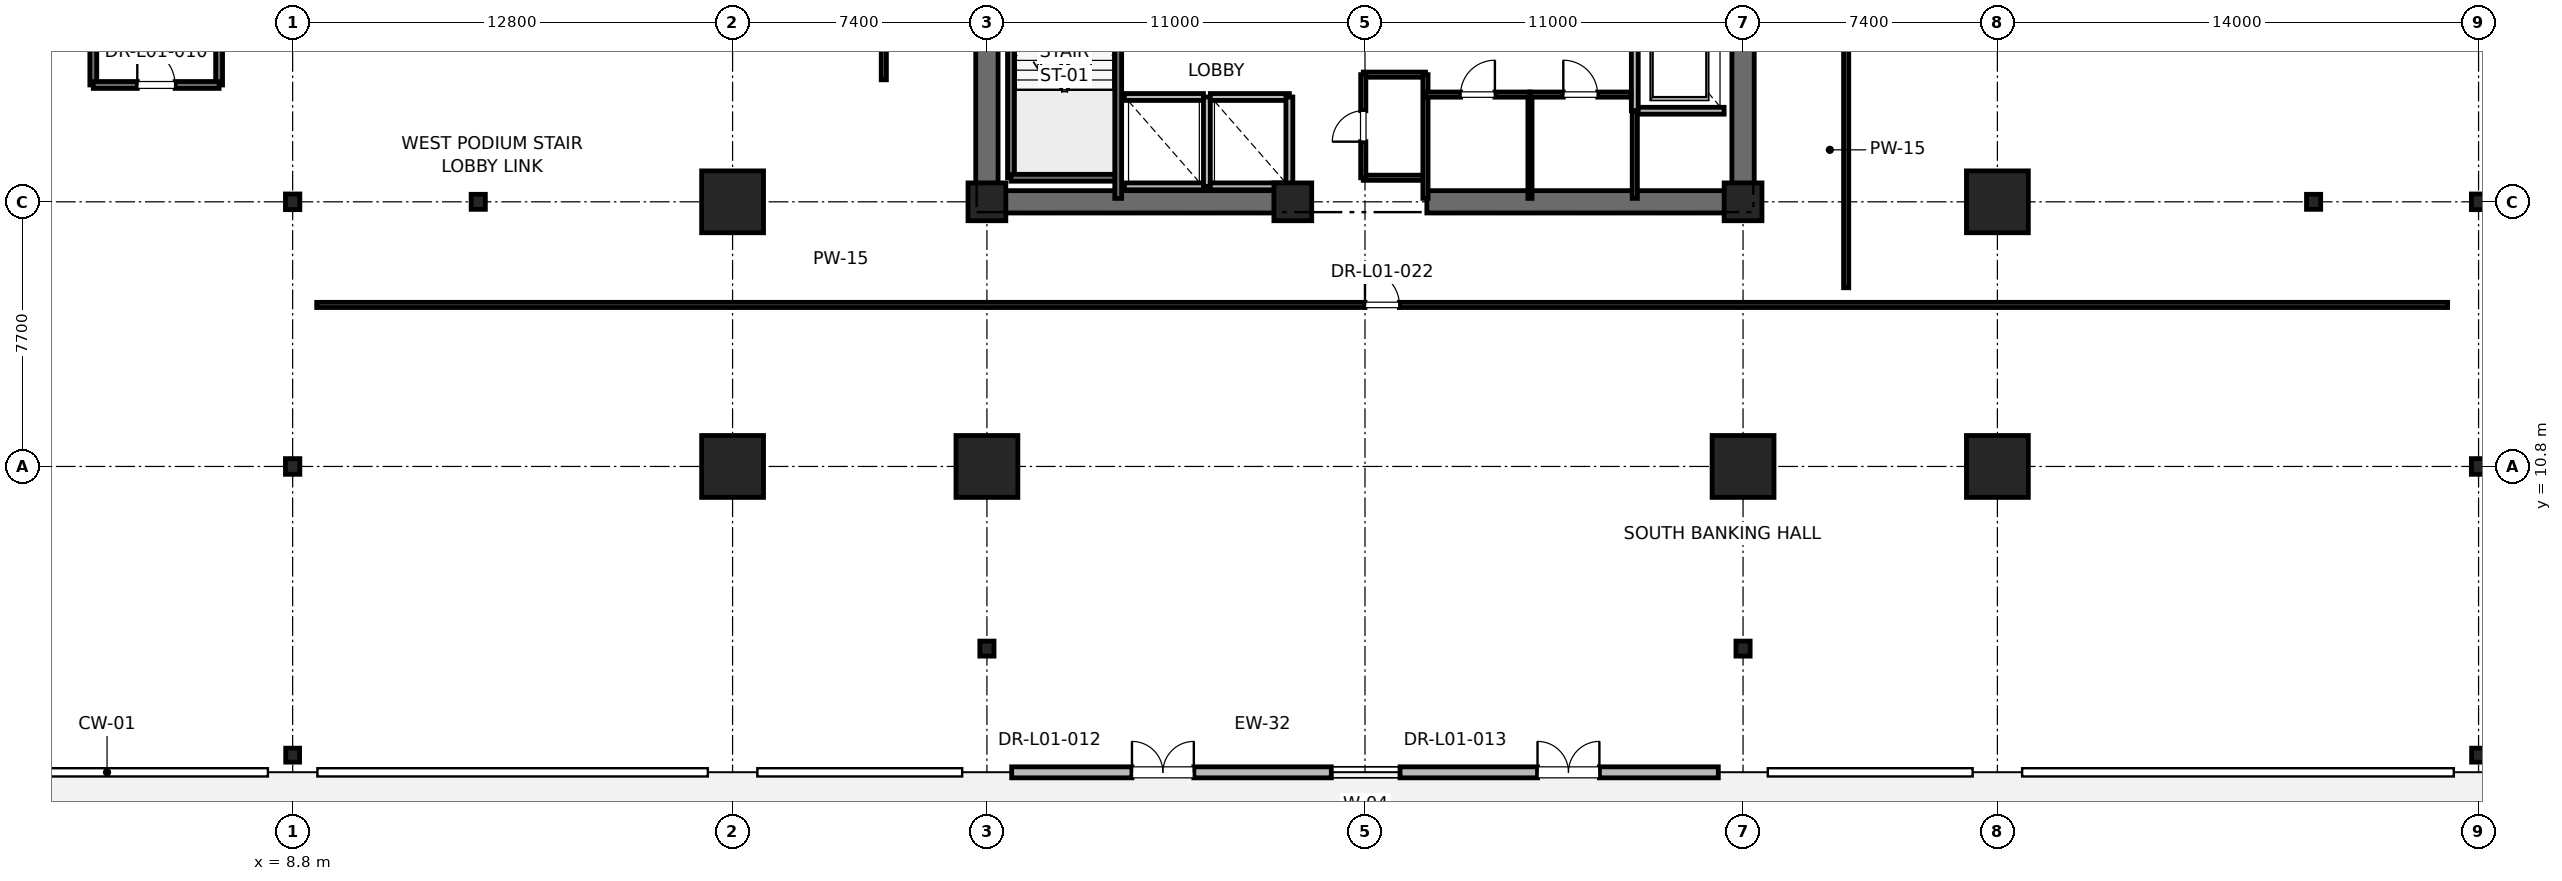
"""IFC4 building model, lengths in metres.
Left out: names, types, materials, properties, quantities, classifications, styles, units other than length and angle.
Written with IfcOpenShell. Run it as: python <this file> out.ifc"""

import sys

from ifc_helpers import new_model, si_unit, direction, frame, frame_2d, origin, origin_2d, place, context, subcontext, project, spatial, rectangle, i_section, extrude, element, fill, save


model = new_model("IFC4")
c1 = context("Model", 3, precision=1e-05, world=origin(), true_north=direction((0.0, 1.0)))
c2 = subcontext(c1, "Body", "Model", "MODEL_VIEW")
j1 = project(units=[si_unit("LENGTHUNIT", "METRE"), si_unit("PLANEANGLEUNIT", "RADIAN")], contexts=[c1])
p1 = place(None, origin())
s1 = spatial("IfcSite", under=j1, at=p1, CompositionType="ELEMENT")
p2 = place(p1, origin())
s2 = spatial("IfcBuilding", under=s1, at=p2, CompositionType="ELEMENT")
p3 = place(p2, frame((0.0, 0.0, 6.0)))
s3 = spatial("IfcBuildingStorey", under=s2, at=p3, CompositionType="ELEMENT", Elevation=6.0)
for number, where, z_axis, x_axis in (
    (1, (29.0, 10.8, 0.0), (0.0, 0.0, 1.0), (1.0, 0.0, 0.0)),
    (2, (51.0, 10.8, 0.0), (0.0, 0.0, 1.0), (1.0, 0.0, 0.0)),
    (3, (21.6, 18.5, 0.0), (0.0, 0.0, 1.0), (1.0, 0.0, 0.0)),
    (4, (58.4, 18.5, 0.0), (0.0, 0.0, 1.0), (1.0, 0.0, 0.0)),
    (5, (21.6, 10.8, 0.0), (0.0, 0.0, 1.0), (1.0, 0.0, 0.0)),
    (6, (58.4, 10.8, 0.0), (0.0, 0.0, 1.0), (1.0, 0.0, 0.0)),
):
    element("IfcColumn", number, at=place(p3, frame(where, z_axis=z_axis, x_axis=x_axis)), inside=s3, PredefinedType="COLUMN", context=c2, shape_type="SweptSolid", body=[
        extrude(rectangle(XDim=1.8, YDim=1.8, at=origin_2d()), origin(), (0.0, 0.0, 1.0), 5.2),
    ])
for number, where, z_axis, x_axis in (
    (7, (14.2, 18.5, 0.0), (0.0, 0.0, 1.0), (1.0, 0.0, 0.0)),
    (8, (67.6, 18.5, 0.0), (0.0, 0.0, 1.0), (1.0, 0.0, 0.0)),
    (9, (29.0, 5.5, 0.0), (0.0, 0.0, 1.0), (1.0, 0.0, 0.0)),
    (10, (51.0, 5.5, 0.0), (0.0, 0.0, 1.0), (1.0, 0.0, 0.0)),
):
    element("IfcColumn", number, at=place(p3, frame(where, z_axis=z_axis, x_axis=x_axis)), inside=s3, PredefinedType="COLUMN", context=c2, shape_type="SweptSolid", body=[
        extrude(i_section(OverallWidth=0.412, OverallDepth=0.437, WebThickness=0.036, FlangeThickness=0.058, FilletRadius=0.015, at=origin_2d()), origin(), (0.0, 0.0, 1.0), 5.2),
    ])
for number, where, z_axis, x_axis in (
    (11, (29.0, 18.5, 0.0), (0.0, 0.0, 1.0), (1.0, 0.0, 0.0)),
    (12, (51.0, 18.5, 0.0), (0.0, 0.0, 1.0), (1.0, 0.0, 0.0)),
    (13, (37.9, 18.5, 0.0), (0.0, 0.0, 1.0), (1.0, 0.0, 0.0)),
):
    element("IfcColumn", number, at=place(p3, frame(where, z_axis=z_axis, x_axis=x_axis)), inside=s3, PredefinedType="PILASTER", context=c2, shape_type="SweptSolid", body=[
        extrude(rectangle(XDim=1.1, YDim=1.1, at=origin_2d()), origin(), (0.0, 0.0, 1.0), 5.2),
    ])
for number, where, z_axis, x_axis in (
    (14, (8.8, 10.8, 0.0), (0.0, 0.0, 1.0), (1.0, 0.0, 0.0)),
    (15, (8.8, 18.5, 0.0), (0.0, 0.0, 1.0), (1.0, 0.0, 0.0)),
    (16, (72.4, 10.8, 0.0), (0.0, 0.0, 1.0), (1.0, 0.0, 0.0)),
    (17, (72.4, 18.5, 0.0), (0.0, 0.0, 1.0), (1.0, 0.0, 0.0)),
):
    element("IfcColumn", number, at=place(p3, frame(where, z_axis=z_axis, x_axis=x_axis)), inside=s3, PredefinedType="COLUMN", context=c2, shape_type="SweptSolid", body=[
        extrude(i_section(OverallWidth=0.418, OverallDepth=0.456, WebThickness=0.042, FlangeThickness=0.067, FilletRadius=0.015, at=origin_2d()), origin(), (0.0, 0.0, 1.0), 5.2),
    ])
for number, where, z_axis, x_axis in (
    (18, (8.8, 2.4, 0.0), (0.0, 0.0, 1.0), (1.0, 0.0, 0.0)),
    (19, (72.4, 2.4, 0.0), (0.0, 0.0, 1.0), (1.0, 0.0, 0.0)),
):
    element("IfcColumn", number, at=place(p3, frame(where, z_axis=z_axis, x_axis=x_axis)), inside=s3, PredefinedType="COLUMN", context=c2, shape_type="SweptSolid", body=[
        extrude(i_section(OverallWidth=0.403, OverallDepth=0.406, WebThickness=0.027, FlangeThickness=0.043, FilletRadius=0.015, at=origin_2d()), origin(), (0.0, 0.0, 1.0), 4.9),
    ])
for number, where, z_axis, x_axis in (
    (20, (29.0, 18.5, 0.0), (0.0, 0.0, 1.0), (1.0, 0.0, 0.0)),
    (21, (41.8, 18.5, 0.0), (0.0, 0.0, 1.0), (1.0, 0.0, 0.0)),
):
    element("IfcWall", number, at=place(p3, frame(where, z_axis=z_axis, x_axis=x_axis)), inside=s3, PredefinedType="SHEAR", context=c2, shape_type="SweptSolid", body=[
        extrude(rectangle(XDim=9.2, YDim=0.65, at=frame_2d((4.6, 0.0))), origin(), (0.0, 0.0, 1.0), 4.92),
    ])
p4 = place(p3, frame((29.0, 18.5, 0.0), z_axis=(0.0, 0.0, 1.0), x_axis=(0.0, 1.0, 0.0)))
e22 = element("IfcWall", 22, at=p4, inside=s3, PredefinedType="SHEAR", context=c2, shape_type="SweptSolid", body=[
    extrude(rectangle(XDim=8.8, YDim=0.65, at=frame_2d((4.4, 0.0))), origin(), (0.0, 0.0, 1.0), 4.92),
])
p5 = place(p3, frame((51.0, 18.5, 0.0), z_axis=(0.0, 0.0, 1.0), x_axis=(0.0, 1.0, 0.0)))
e23 = element("IfcWall", 23, at=p5, inside=s3, PredefinedType="SHEAR", context=c2, shape_type="SweptSolid", body=[
    extrude(rectangle(XDim=5.8, YDim=0.65, at=frame_2d((2.9, 0.0))), origin(), (0.0, 0.0, 1.0), 4.92),
])
p6 = place(p3, frame((29.72, 1.9, 0.0), z_axis=(0.0, 0.0, 1.0), x_axis=(1.0, 0.0, 0.0)))
e24 = element("IfcWall", 24, at=p6, inside=s3, PredefinedType="SOLIDWALL", context=c2, shape_type="SweptSolid", body=[
    extrude(rectangle(XDim=20.56, YDim=0.32, at=frame_2d((10.28, 0.0))), origin(), (0.0, 0.0, 1.0), 3.53),
])
p7 = place(p6, frame((3.5, 0.0, 0.0)))
e25 = element("IfcOpeningElement", 25, at=p7, cuts=e24, PredefinedType="OPENING", context=c2, shape_type="SweptSolid", body=[
    extrude(rectangle(XDim=1.8, YDim=2.4, at=frame_2d((0.9, 1.2))), frame((0.0, 0.16, 0.0), z_axis=(0.0, -1.0, 0.0), x_axis=(1.0, 0.0, 0.0)), (0.0, 0.0, 1.0), 0.32),
])
p8 = place(p6, frame((9.3, 0.0, 0.9)))
e26 = element("IfcOpeningElement", 26, at=p8, cuts=e24, PredefinedType="OPENING", context=c2, shape_type="SweptSolid", body=[
    extrude(rectangle(XDim=2.0, YDim=2.3, at=frame_2d((1.0, 1.15))), frame((0.0, 0.16, 0.0), z_axis=(0.0, -1.0, 0.0), x_axis=(1.0, 0.0, 0.0)), (0.0, 0.0, 1.0), 0.32),
])
p9 = place(p6, frame((15.3, 0.0, 0.0)))
e27 = element("IfcOpeningElement", 27, at=p9, cuts=e24, PredefinedType="OPENING", context=c2, shape_type="SweptSolid", body=[
    extrude(rectangle(XDim=1.8, YDim=2.4, at=frame_2d((0.9, 1.2))), frame((0.0, 0.16, 0.0), z_axis=(0.0, -1.0, 0.0), x_axis=(1.0, 0.0, 0.0)), (0.0, 0.0, 1.0), 0.32),
])
p10 = place(p3, frame((29.7, 19.2, 0.0), z_axis=(0.0, 0.0, 1.0), x_axis=(0.0, 1.0, 0.0)))
e28 = element("IfcWall", 28, at=p10, inside=s3, PredefinedType="SOLIDWALL", context=c2, shape_type="SweptSolid", body=[
    extrude(rectangle(XDim=8.15, YDim=0.2, at=frame_2d((4.075, 0.0))), origin(), (0.0, 0.0, 1.0), 4.92),
])
p11 = place(p3, frame((29.7, 19.2, 0.0), z_axis=(0.0, 0.0, 1.0), x_axis=(1.0, 0.0, 0.0)))
e29 = element("IfcWall", 29, at=p11, inside=s3, PredefinedType="SOLIDWALL", context=c2, shape_type="SweptSolid", body=[
    extrude(rectangle(XDim=3.12, YDim=0.2, at=frame_2d((1.56, 0.0))), origin(), (0.0, 0.0, 1.0), 4.92),
])
p12 = place(p3, frame((32.82, 18.6, 0.0), z_axis=(0.0, 0.0, 1.0), x_axis=(0.0, 1.0, 0.0)))
e30 = element("IfcWall", 30, at=p12, inside=s3, PredefinedType="SOLIDWALL", context=c2, shape_type="SweptSolid", body=[
    extrude(rectangle(XDim=8.78, YDim=0.2, at=frame_2d((4.39, 0.0))), origin(), (0.0, 0.0, 1.0), 4.92),
])
for number, where, z_axis, x_axis in (
    (31, (3.0, 21.9, 0.0), (0.0, 0.0, 1.0), (0.0, 1.0, 0.0)),
    (32, (6.66, 21.9, 0.0), (0.0, 0.0, 1.0), (0.0, 1.0, 0.0)),
):
    element("IfcWall", number, at=place(p3, frame(where, z_axis=z_axis, x_axis=x_axis)), inside=s3, PredefinedType="SOLIDWALL", context=c2, shape_type="SweptSolid", body=[
        extrude(rectangle(XDim=8.7, YDim=0.2, at=frame_2d((4.35, 0.0))), origin(), (0.0, 0.0, 1.0), 4.92),
    ])
p13 = place(p3, frame((3.0, 21.9, 0.0), z_axis=(0.0, 0.0, 1.0), x_axis=(1.0, 0.0, 0.0)))
e33 = element("IfcWall", 33, at=p13, inside=s3, PredefinedType="SOLIDWALL", context=c2, shape_type="SweptSolid", body=[
    extrude(rectangle(XDim=3.66, YDim=0.2, at=frame_2d((1.83, 0.0))), origin(), (0.0, 0.0, 1.0), 4.92),
])
p14 = place(p13, frame((1.28, 0.0, 0.0)))
e34 = element("IfcOpeningElement", 34, at=p14, cuts=e33, PredefinedType="OPENING", context=c2, shape_type="SweptSolid", body=[
    extrude(rectangle(XDim=1.1, YDim=2.15, at=frame_2d((0.55, 1.075))), frame((0.0, 0.1, 0.0), z_axis=(0.0, -1.0, 0.0), x_axis=(1.0, 0.0, 0.0)), (0.0, 0.0, 1.0), 0.2),
])
p15 = place(p3, frame((47.85, 21.15, 0.0), z_axis=(0.0, 0.0, 1.0), x_axis=(1.0, 0.0, 0.0)))
e35 = element("IfcWall", 35, at=p15, inside=s3, PredefinedType="SOLIDWALL", context=c2, shape_type="SweptSolid", body=[
    extrude(rectangle(XDim=2.6, YDim=0.2, at=frame_2d((1.3, 0.0))), origin(), (0.0, 0.0, 1.0), 4.92),
])
p16 = place(p3, frame((47.85, 24.15, 0.0), z_axis=(0.0, 0.0, 1.0), x_axis=(0.0, -1.0, 0.0)))
e36 = element("IfcWall", 36, at=p16, inside=s3, PredefinedType="SOLIDWALL", context=c2, shape_type="SweptSolid", body=[
    extrude(rectangle(XDim=3.0, YDim=0.2, at=frame_2d((1.5, 0.0))), origin(), (0.0, 0.0, 1.0), 4.92),
])
for number, where, z_axis, x_axis in (
    (37, (33.0, 18.95, 0.0), (0.0, 0.0, 1.0), (1.0, 0.0, 0.0)),
    (38, (35.3, 21.55, 0.0), (0.0, 0.0, 1.0), (-1.0, 0.0, 0.0)),
):
    element("IfcWall", number, at=place(p3, frame(where, z_axis=z_axis, x_axis=x_axis)), inside=s3, PredefinedType="SOLIDWALL", context=c2, shape_type="SweptSolid", body=[
        extrude(rectangle(XDim=2.3, YDim=0.2, at=frame_2d((1.15, 0.0))), origin(), (0.0, 0.0, 1.0), 4.92),
    ])
p17 = place(p3, frame((35.4, 18.95, 0.0), z_axis=(0.0, 0.0, 1.0), x_axis=(0.0, 1.0, 0.0)))
e39 = element("IfcWall", 39, at=p17, inside=s3, PredefinedType="SOLIDWALL", context=c2, shape_type="SweptSolid", body=[
    extrude(rectangle(XDim=2.6, YDim=0.2, at=frame_2d((1.3, 0.0))), origin(), (0.0, 0.0, 1.0), 4.92),
])
p18 = place(p3, frame((35.5, 18.95, 0.0), z_axis=(0.0, 0.0, 1.0), x_axis=(1.0, 0.0, 0.0)))
e40 = element("IfcWall", 40, at=p18, inside=s3, PredefinedType="SOLIDWALL", context=c2, shape_type="SweptSolid", body=[
    extrude(rectangle(XDim=2.3, YDim=0.2, at=frame_2d((1.15, 0.0))), origin(), (0.0, 0.0, 1.0), 3.7),
])
p19 = place(p3, frame((37.8, 21.55, 0.0), z_axis=(0.0, 0.0, 1.0), x_axis=(-1.0, 0.0, 0.0)))
e41 = element("IfcWall", 41, at=p19, inside=s3, PredefinedType="SOLIDWALL", context=c2, shape_type="SweptSolid", body=[
    extrude(rectangle(XDim=2.3, YDim=0.2, at=frame_2d((1.15, 0.0))), origin(), (0.0, 0.0, 1.0), 4.92),
])
p20 = place(p3, frame((37.8, 18.95, 0.0), z_axis=(0.0, 0.0, 1.0), x_axis=(0.0, 1.0, 0.0)))
e42 = element("IfcWall", 42, at=p20, inside=s3, PredefinedType="SOLIDWALL", context=c2, shape_type="SweptSolid", body=[
    extrude(rectangle(XDim=2.6, YDim=0.2, at=frame_2d((1.3, 0.0))), origin(), (0.0, 0.0, 1.0), 3.7),
])
for number, where, z_axis, x_axis in (
    (43, (39.95, 19.2, 0.0), (0.0, 0.0, 1.0), (1.0, 0.0, 0.0)),
    (44, (39.95, 22.2, 0.0), (0.0, 0.0, 1.0), (1.0, 0.0, 0.0)),
):
    element("IfcWall", number, at=place(p3, frame(where, z_axis=z_axis, x_axis=x_axis)), inside=s3, PredefinedType="PARTITIONING", context=c2, shape_type="SweptSolid", body=[
        extrude(rectangle(XDim=1.81, YDim=0.15, at=frame_2d((0.905, 0.0))), origin(), (0.0, 0.0, 1.0), 2.85),
    ])
p21 = place(p3, frame((41.76, 18.6, 0.0), z_axis=(0.0, 0.0, 1.0), x_axis=(0.0, 1.0, 0.0)))
e45 = element("IfcWall", 45, at=p21, inside=s3, PredefinedType="PARTITIONING", context=c2, shape_type="SweptSolid", body=[
    extrude(rectangle(XDim=3.6, YDim=0.15, at=frame_2d((1.8, 0.0))), origin(), (0.0, 0.0, 1.0), 2.85),
])
p22 = place(p3, frame((39.95, 19.2, 0.0), z_axis=(0.0, 0.0, 1.0), x_axis=(0.0, 1.0, 0.0)))
e46 = element("IfcWall", 46, at=p22, inside=s3, PredefinedType="PARTITIONING", context=c2, shape_type="SweptSolid", body=[
    extrude(rectangle(XDim=3.0, YDim=0.15, at=frame_2d((1.5, 0.0))), origin(), (0.0, 0.0, 1.0), 2.85),
])
p23 = place(p22, frame((1.05, 0.0, 0.0)))
e47 = element("IfcOpeningElement", 47, at=p23, cuts=e46, PredefinedType="OPENING", context=c2, shape_type="SweptSolid", body=[
    extrude(rectangle(XDim=0.9, YDim=2.1, at=frame_2d((0.45, 1.05))), frame((0.0, 0.075, 0.0), z_axis=(0.0, -1.0, 0.0), x_axis=(1.0, 0.0, 0.0)), (0.0, 0.0, 1.0), 0.15),
])
p24 = place(p3, frame((47.85, 18.6, 0.0), z_axis=(0.0, 0.0, 1.0), x_axis=(0.0, 1.0, 0.0)))
e48 = element("IfcWall", 48, at=p24, inside=s3, PredefinedType="PARTITIONING", context=c2, shape_type="SweptSolid", body=[
    extrude(rectangle(XDim=2.54, YDim=0.15, at=frame_2d((1.27, 0.0))), origin(), (0.0, 0.0, 1.0), 2.85),
])
p25 = place(p3, frame((44.8, 18.6, 0.0), z_axis=(0.0, 0.0, 1.0), x_axis=(0.0, 1.0, 0.0)))
e49 = element("IfcWall", 49, at=p25, inside=s3, PredefinedType="PARTITIONING", context=c2, shape_type="SweptSolid", body=[
    extrude(rectangle(XDim=3.02, YDim=0.12, at=frame_2d((1.51, 0.0))), origin(), (0.0, 0.0, 1.0), 2.85),
])
p26 = place(p3, frame((41.76, 21.62, 0.0), z_axis=(0.0, 0.0, 1.0), x_axis=(1.0, 0.0, 0.0)))
e50 = element("IfcWall", 50, at=p26, inside=s3, PredefinedType="PARTITIONING", context=c2, shape_type="SweptSolid", body=[
    extrude(rectangle(XDim=3.04, YDim=0.15, at=frame_2d((1.52, 0.0))), origin(), (0.0, 0.0, 1.0), 2.85),
])
p27 = place(p26, frame((1.02, 0.0, 0.0)))
e51 = element("IfcOpeningElement", 51, at=p27, cuts=e50, PredefinedType="OPENING", context=c2, shape_type="SweptSolid", body=[
    extrude(rectangle(XDim=1.0, YDim=2.15, at=frame_2d((0.5, 1.075))), frame((0.0, 0.075, 0.0), z_axis=(0.0, -1.0, 0.0), x_axis=(1.0, 0.0, 0.0)), (0.0, 0.0, 1.0), 0.15),
])
p28 = place(p3, frame((44.8, 21.62, 0.0), z_axis=(0.0, 0.0, 1.0), x_axis=(1.0, 0.0, 0.0)))
e52 = element("IfcWall", 52, at=p28, inside=s3, PredefinedType="PARTITIONING", context=c2, shape_type="SweptSolid", body=[
    extrude(rectangle(XDim=2.94, YDim=0.15, at=frame_2d((1.47, 0.0))), origin(), (0.0, 0.0, 1.0), 2.85),
])
p29 = place(p28, frame((0.97, 0.0, 0.0)))
e53 = element("IfcOpeningElement", 53, at=p29, cuts=e52, PredefinedType="OPENING", context=c2, shape_type="SweptSolid", body=[
    extrude(rectangle(XDim=1.0, YDim=2.15, at=frame_2d((0.5, 1.075))), frame((0.0, 0.075, 0.0), z_axis=(0.0, -1.0, 0.0), x_axis=(1.0, 0.0, 0.0)), (0.0, 0.0, 1.0), 0.15),
])
p30 = place(p3, frame((9.5, 15.5, 0.0), z_axis=(0.0, 0.0, 1.0), x_axis=(1.0, 0.0, 0.0)))
e54 = element("IfcWall", 54, at=p30, inside=s3, PredefinedType="PARTITIONING", context=c2, shape_type="SweptSolid", body=[
    extrude(rectangle(XDim=62.0, YDim=0.15, at=frame_2d((31.0, 0.0))), origin(), (0.0, 0.0, 1.0), 2.85),
])
p31 = place(p30, frame((30.5, 0.0, 0.0)))
e55 = element("IfcOpeningElement", 55, at=p31, cuts=e54, PredefinedType="OPENING", context=c2, shape_type="SweptSolid", body=[
    extrude(rectangle(XDim=1.0, YDim=2.15, at=frame_2d((0.5, 1.075))), frame((0.0, 0.075, 0.0), z_axis=(0.0, -1.0, 0.0), x_axis=(1.0, 0.0, 0.0)), (0.0, 0.0, 1.0), 0.15),
])
p32 = place(p3, frame((26.0, 22.05, 0.0), z_axis=(0.0, 0.0, 1.0), x_axis=(0.0, 1.0, 0.0)))
e56 = element("IfcWall", 56, at=p32, inside=s3, PredefinedType="PARTITIONING", context=c2, shape_type="SweptSolid", body=[
    extrude(rectangle(XDim=16.95, YDim=0.15, at=frame_2d((8.475, 0.0))), origin(), (0.0, 0.0, 1.0), 2.85),
])
p33 = place(p32, frame((6.675, 0.0, 0.0)))
e57 = element("IfcOpeningElement", 57, at=p33, cuts=e56, PredefinedType="OPENING", context=c2, shape_type="SweptSolid", body=[
    extrude(rectangle(XDim=1.0, YDim=2.15, at=frame_2d((0.5, 1.075))), frame((0.0, 0.075, 0.0), z_axis=(0.0, -1.0, 0.0), x_axis=(1.0, 0.0, 0.0)), (0.0, 0.0, 1.0), 0.15),
])
p34 = place(p3, frame((54.0, 16.0, 0.0), z_axis=(0.0, 0.0, 1.0), x_axis=(0.0, 1.0, 0.0)))
e58 = element("IfcWall", 58, at=p34, inside=s3, PredefinedType="PARTITIONING", context=c2, shape_type="SweptSolid", body=[
    extrude(rectangle(XDim=14.45, YDim=0.15, at=frame_2d((7.225, 0.0))), origin(), (0.0, 0.0, 1.0), 2.85),
])
p35 = place(p34, frame((8.025, 0.0, 0.0)))
e59 = element("IfcOpeningElement", 59, at=p35, cuts=e58, PredefinedType="OPENING", context=c2, shape_type="SweptSolid", body=[
    extrude(rectangle(XDim=1.0, YDim=2.15, at=frame_2d((0.5, 1.075))), frame((0.0, 0.075, 0.0), z_axis=(0.0, -1.0, 0.0), x_axis=(1.0, 0.0, 0.0)), (0.0, 0.0, 1.0), 0.15),
])
p36 = place(p7, origin())
e60 = element("IfcDoor", 60, at=p36, inside=s3, OperationType="DOUBLE_DOOR_SINGLE_SWING", PredefinedType="DOOR", context=c2, shape_type="SweptSolid", body=[
    extrude(rectangle(XDim=1.8, YDim=2.4, at=frame_2d((0.9, 1.2))), frame((0.0, 0.025, 0.0), z_axis=(0.0, -1.0, 0.0), x_axis=(1.0, 0.0, 0.0)), (0.0, 0.0, 1.0), 0.05),
])
fill(e25, e60)
p37 = place(p8, origin())
e61 = element("IfcWindow", 61, at=p37, inside=s3, PartitioningType="SINGLE_PANEL", PredefinedType="WINDOW", context=c2, shape_type="SweptSolid", body=[
    extrude(rectangle(XDim=2.0, YDim=2.3, at=frame_2d((1.0, 1.15))), frame((0.0, 0.03, 0.0), z_axis=(0.0, -1.0, 0.0), x_axis=(1.0, 0.0, 0.0)), (0.0, 0.0, 1.0), 0.06),
])
fill(e26, e61)
p38 = place(p9, origin())
e62 = element("IfcDoor", 62, at=p38, inside=s3, OperationType="DOUBLE_DOOR_SINGLE_SWING", PredefinedType="DOOR", context=c2, shape_type="SweptSolid", body=[
    extrude(rectangle(XDim=1.8, YDim=2.4, at=frame_2d((0.9, 1.2))), frame((0.0, 0.025, 0.0), z_axis=(0.0, -1.0, 0.0), x_axis=(1.0, 0.0, 0.0)), (0.0, 0.0, 1.0), 0.05),
])
fill(e27, e62)
p39 = place(p14, origin())
e63 = element("IfcDoor", 63, at=p39, inside=s3, OperationType="SINGLE_SWING_LEFT", PredefinedType="DOOR", context=c2, shape_type="SweptSolid", body=[
    extrude(rectangle(XDim=1.1, YDim=2.15, at=frame_2d((0.55, 1.075))), frame((0.0, 0.025, 0.0), z_axis=(0.0, -1.0, 0.0), x_axis=(1.0, 0.0, 0.0)), (0.0, 0.0, 1.0), 0.05),
])
fill(e34, e63)
p40 = place(p23, origin())
e64 = element("IfcDoor", 64, at=p40, inside=s3, OperationType="SINGLE_SWING_LEFT", PredefinedType="DOOR", context=c2, shape_type="SweptSolid", body=[
    extrude(rectangle(XDim=0.9, YDim=2.1, at=frame_2d((0.45, 1.05))), frame((0.0, 0.025, 0.0), z_axis=(0.0, -1.0, 0.0), x_axis=(1.0, 0.0, 0.0)), (0.0, 0.0, 1.0), 0.05),
])
fill(e47, e64)
p41 = place(p27, origin())
e65 = element("IfcDoor", 65, at=p41, inside=s3, OperationType="SINGLE_SWING_RIGHT", PredefinedType="DOOR", context=c2, shape_type="SweptSolid", body=[
    extrude(rectangle(XDim=1.0, YDim=2.15, at=frame_2d((0.5, 1.075))), frame((0.0, 0.025, 0.0), z_axis=(0.0, -1.0, 0.0), x_axis=(1.0, 0.0, 0.0)), (0.0, 0.0, 1.0), 0.05),
])
fill(e51, e65)
p42 = place(p29, origin())
e66 = element("IfcDoor", 66, at=p42, inside=s3, OperationType="SINGLE_SWING_LEFT", PredefinedType="DOOR", context=c2, shape_type="SweptSolid", body=[
    extrude(rectangle(XDim=1.0, YDim=2.15, at=frame_2d((0.5, 1.075))), frame((0.0, 0.025, 0.0), z_axis=(0.0, -1.0, 0.0), x_axis=(1.0, 0.0, 0.0)), (0.0, 0.0, 1.0), 0.05),
])
fill(e53, e66)
p43 = place(p31, origin())
e67 = element("IfcDoor", 67, at=p43, inside=s3, OperationType="SINGLE_SWING_LEFT", PredefinedType="DOOR", context=c2, shape_type="SweptSolid", body=[
    extrude(rectangle(XDim=1.0, YDim=2.15, at=frame_2d((0.5, 1.075))), frame((0.0, 0.025, 0.0), z_axis=(0.0, -1.0, 0.0), x_axis=(1.0, 0.0, 0.0)), (0.0, 0.0, 1.0), 0.05),
])
fill(e55, e67)
save(model, sys.argv[1])
